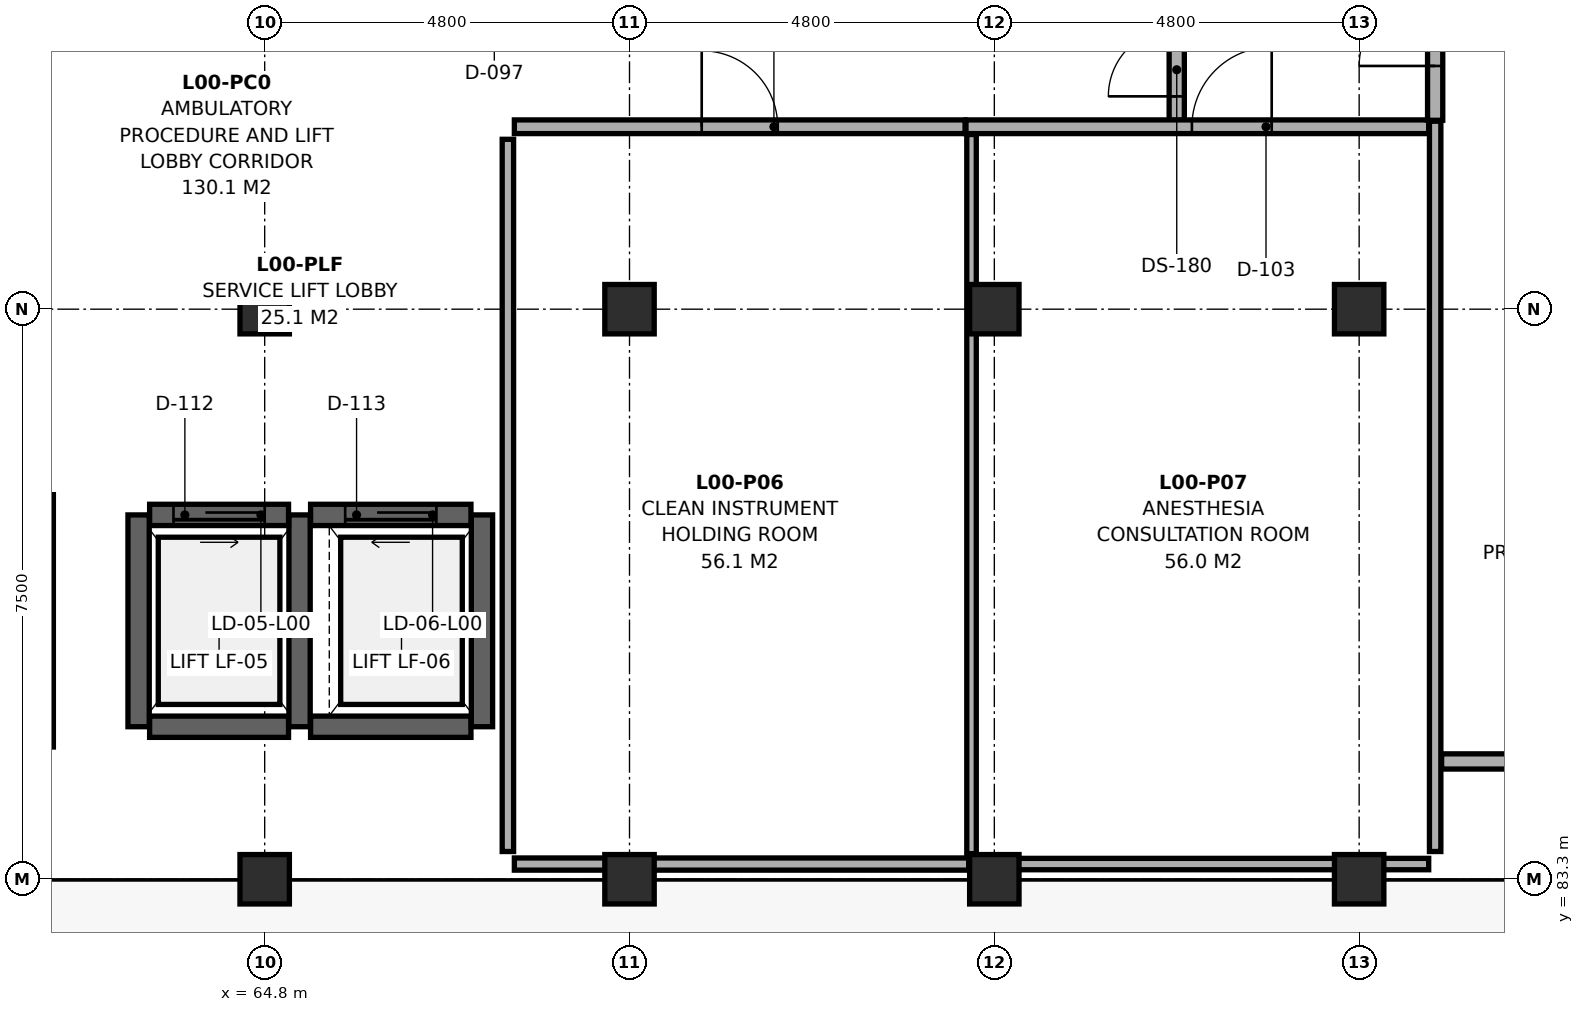
"""IFC4 building model, lengths in metres.
Left out: names, types, materials, properties, quantities, classifications, styles, units other than length and angle.
Written with IfcOpenShell. Run it as: python <this file> out.ifc"""

import sys

from ifc_helpers import new_model, si_unit, direction, frame, frame_2d, origin, origin_2d, place, context, subcontext, project, spatial, rectangle, extrude, element, fill, save


model = new_model("IFC4")
c1 = context("Model", 3, precision=1e-05, world=origin(), true_north=direction((0.0, 1.0)))
c2 = subcontext(c1, "Body", "Model", "MODEL_VIEW")
j1 = project(units=[si_unit("LENGTHUNIT", "METRE"), si_unit("PLANEANGLEUNIT", "RADIAN")], contexts=[c1])
p1 = place(None, origin())
s1 = spatial("IfcSite", under=j1, at=p1, CompositionType="ELEMENT")
p2 = place(p1, origin())
s2 = spatial("IfcBuilding", under=s1, at=p2, CompositionType="ELEMENT")
p3 = place(p2, origin())
s3 = spatial("IfcBuildingStorey", under=s2, at=p3, CompositionType="ELEMENT", Elevation=0.0)
for number, where, z_axis, x_axis in (
    (1, (64.8, 83.3, 0.0), (0.0, 0.0, 1.0), (1.0, 0.0, 0.0)),
    (2, (64.8, 90.8, 0.0), (0.0, 0.0, 1.0), (1.0, 0.0, 0.0)),
    (3, (69.6, 83.3, 0.0), (0.0, 0.0, 1.0), (1.0, 0.0, 0.0)),
    (4, (69.6, 90.8, 0.0), (0.0, 0.0, 1.0), (1.0, 0.0, 0.0)),
    (5, (74.4, 83.3, 0.0), (0.0, 0.0, 1.0), (1.0, 0.0, 0.0)),
    (6, (74.4, 90.8, 0.0), (0.0, 0.0, 1.0), (1.0, 0.0, 0.0)),
    (7, (79.2, 83.3, 0.0), (0.0, 0.0, 1.0), (1.0, 0.0, 0.0)),
    (8, (79.2, 90.8, 0.0), (0.0, 0.0, 1.0), (1.0, 0.0, 0.0)),
):
    element("IfcColumn", number, at=place(p3, frame(where, z_axis=z_axis, x_axis=x_axis)), inside=s3, PredefinedType="COLUMN", context=c2, shape_type="SweptSolid", body=[
        extrude(rectangle(XDim=0.65, YDim=0.65, at=origin_2d()), origin(), (0.0, 0.0, 1.0), 4.7),
    ])
p4 = place(p3, frame((61.86, 85.04, 0.0), z_axis=(0.0, 0.0, 1.0), x_axis=(0.0, 1.0, 0.0)))
e9 = element("IfcWall", 9, at=p4, inside=s3, PredefinedType="SHEAR", context=c2, shape_type="SweptSolid", body=[
    extrude(rectangle(XDim=3.32, YDim=0.32, at=frame_2d((1.66, 0.0))), origin(), (0.0, 0.0, 1.0), 4.7),
])
p5 = place(p3, frame((63.286, 85.307, 0.0), z_axis=(0.0, 0.0, 1.0), x_axis=(1.0, 0.0, 0.0)))
e10 = element("IfcWall", 10, at=p5, inside=s3, PredefinedType="SHEAR", context=c2, shape_type="SweptSolid", body=[
    extrude(rectangle(XDim=1.828, YDim=0.28, at=frame_2d((0.914, 0.0))), origin(), (0.0, 0.0, 1.0), 4.7),
])
p6 = place(p3, frame((65.259, 85.307, 0.0), z_axis=(0.0, 0.0, 1.0), x_axis=(0.0, 1.0, 0.0)))
e11 = element("IfcWall", 11, at=p6, inside=s3, PredefinedType="SHEAR", context=c2, shape_type="SweptSolid", body=[
    extrude(rectangle(XDim=2.787, YDim=0.28, at=frame_2d((1.393, 0.0))), origin(), (0.0, 0.0, 1.0), 4.7),
])
p7 = place(p3, frame((65.114, 88.093, 0.0), z_axis=(0.0, 0.0, 1.0), x_axis=(-1.0, 0.0, 0.0)))
e12 = element("IfcWall", 12, at=p7, inside=s3, PredefinedType="SHEAR", context=c2, shape_type="SweptSolid", body=[
    extrude(rectangle(XDim=1.828, YDim=0.28, at=frame_2d((0.914, 0.0))), origin(), (0.0, 0.0, 1.0), 4.7),
])
p8 = place(p7, frame((0.314, 0.0, 0.0)))
e13 = element("IfcOpeningElement", 13, at=p8, cuts=e12, PredefinedType="OPENING", context=c2, shape_type="SweptSolid", body=[
    extrude(rectangle(XDim=1.2, YDim=2.15, at=frame_2d((0.6, 1.075))), frame((0.0, 0.152, 0.0), z_axis=(0.0, -1.0, 0.0), x_axis=(1.0, 0.0, 0.0)), (0.0, 0.0, 1.0), 0.304),
])
p9 = place(p3, frame((63.141, 88.093, 0.0), z_axis=(0.0, 0.0, 1.0), x_axis=(0.0, -1.0, 0.0)))
e14 = element("IfcWall", 14, at=p9, inside=s3, PredefinedType="SHEAR", context=c2, shape_type="SweptSolid", body=[
    extrude(rectangle(XDim=2.787, YDim=0.28, at=frame_2d((1.393, 0.0))), origin(), (0.0, 0.0, 1.0), 4.7),
])
p10 = place(p3, frame((65.404, 85.307, 0.0), z_axis=(0.0, 0.0, 1.0), x_axis=(1.0, 0.0, 0.0)))
e15 = element("IfcWall", 15, at=p10, inside=s3, PredefinedType="SHEAR", context=c2, shape_type="SweptSolid", body=[
    extrude(rectangle(XDim=2.11, YDim=0.28, at=frame_2d((1.055, 0.0))), origin(), (0.0, 0.0, 1.0), 4.7),
])
p11 = place(p3, frame((67.659, 85.307, 0.0), z_axis=(0.0, 0.0, 1.0), x_axis=(0.0, 1.0, 0.0)))
e16 = element("IfcWall", 16, at=p11, inside=s3, PredefinedType="SHEAR", context=c2, shape_type="SweptSolid", body=[
    extrude(rectangle(XDim=2.787, YDim=0.28, at=frame_2d((1.393, 0.0))), origin(), (0.0, 0.0, 1.0), 4.7),
])
p12 = place(p3, frame((67.514, 88.093, 0.0), z_axis=(0.0, 0.0, 1.0), x_axis=(-1.0, 0.0, 0.0)))
e17 = element("IfcWall", 17, at=p12, inside=s3, PredefinedType="SHEAR", context=c2, shape_type="SweptSolid", body=[
    extrude(rectangle(XDim=2.11, YDim=0.28, at=frame_2d((1.055, 0.0))), origin(), (0.0, 0.0, 1.0), 4.7),
])
p13 = place(p12, frame((0.455, 0.0, 0.0)))
e18 = element("IfcOpeningElement", 18, at=p13, cuts=e17, PredefinedType="OPENING", context=c2, shape_type="SweptSolid", body=[
    extrude(rectangle(XDim=1.2, YDim=2.15, at=frame_2d((0.6, 1.075))), frame((0.0, 0.152, 0.0), z_axis=(0.0, -1.0, 0.0), x_axis=(1.0, 0.0, 0.0)), (0.0, 0.0, 1.0), 0.304),
])
p14 = place(p3, frame((76.8, 93.285, 0.0), z_axis=(0.0, 0.0, 1.0), x_axis=(0.0, 1.0, 0.0)))
e19 = element("IfcWall", 19, at=p14, inside=s3, PredefinedType="PARTITIONING", context=c2, shape_type="SweptSolid", body=[
    extrude(rectangle(XDim=2.43, YDim=0.2, at=frame_2d((1.215, 0.0))), origin(), (0.0, 0.0, 1.0), 4.7),
])
p15 = place(p14, frame((0.315, 0.0, 0.0)))
e20 = element("IfcOpeningElement", 20, at=p15, cuts=e19, PredefinedType="OPENING", context=c2, shape_type="SweptSolid", body=[
    extrude(rectangle(XDim=1.8, YDim=2.15, at=frame_2d((0.9, 1.075))), frame((0.0, 0.112, 0.0), z_axis=(0.0, -1.0, 0.0), x_axis=(1.0, 0.0, 0.0)), (0.0, 0.0, 1.0), 0.224),
])
p16 = place(p3, frame((68.085, 93.2, 0.0), z_axis=(0.0, 0.0, 1.0), x_axis=(1.0, 0.0, 0.0)))
e21 = element("IfcWall", 21, at=p16, inside=s3, PredefinedType="PARTITIONING", context=c2, shape_type="SweptSolid", body=[
    extrude(rectangle(XDim=5.93, YDim=0.18, at=frame_2d((2.965, 0.0))), origin(), (0.0, 0.0, 1.0), 3.985),
])
p17 = place(p16, frame((2.465, 0.0, 0.0)))
e22 = element("IfcOpeningElement", 22, at=p17, cuts=e21, PredefinedType="OPENING", context=c2, shape_type="SweptSolid", body=[
    extrude(rectangle(XDim=1.0, YDim=2.15, at=frame_2d((0.5, 1.075))), frame((0.0, 0.102, 0.0), z_axis=(0.0, -1.0, 0.0), x_axis=(1.0, 0.0, 0.0)), (0.0, 0.0, 1.0), 0.204),
])
p18 = place(p3, frame((74.027, 93.2, 0.0), z_axis=(0.0, 0.0, 1.0), x_axis=(1.0, 0.0, 0.0)))
e23 = element("IfcWall", 23, at=p18, inside=s3, PredefinedType="PARTITIONING", context=c2, shape_type="SweptSolid", body=[
    extrude(rectangle(XDim=6.088, YDim=0.18, at=frame_2d((3.044, 0.0))), origin(), (0.0, 0.0, 1.0), 3.985),
])
p19 = place(p18, frame((2.972, 0.0, 0.0)))
e24 = element("IfcOpeningElement", 24, at=p19, cuts=e23, PredefinedType="OPENING", context=c2, shape_type="SweptSolid", body=[
    extrude(rectangle(XDim=1.05, YDim=2.15, at=frame_2d((0.525, 1.075))), frame((0.0, 0.102, 0.0), z_axis=(0.0, -1.0, 0.0), x_axis=(1.0, 0.0, 0.0)), (0.0, 0.0, 1.0), 0.204),
])
p20 = place(p3, frame((80.2, 93.285, 0.0), z_axis=(0.0, 0.0, 1.0), x_axis=(0.0, 1.0, 0.0)))
e25 = element("IfcWall", 25, at=p20, inside=s3, PredefinedType="PARTITIONING", context=c2, shape_type="SweptSolid", body=[
    extrude(rectangle(XDim=2.43, YDim=0.2, at=frame_2d((1.215, 0.0))), origin(), (0.0, 0.0, 1.0), 4.7),
])
p21 = place(p20, frame((0.715, 0.0, 0.0)))
e26 = element("IfcOpeningElement", 26, at=p21, cuts=e25, PredefinedType="OPENING", context=c2, shape_type="SweptSolid", body=[
    extrude(rectangle(XDim=1.0, YDim=2.15, at=frame_2d((0.5, 1.075))), frame((0.0, 0.112, 0.0), z_axis=(0.0, -1.0, 0.0), x_axis=(1.0, 0.0, 0.0)), (0.0, 0.0, 1.0), 0.224),
])
p22 = place(p3, frame((80.285, 84.85, 0.0), z_axis=(0.0, 0.0, 1.0), x_axis=(1.0, 0.0, 0.0)))
e27 = element("IfcWall", 27, at=p22, inside=s3, PredefinedType="PARTITIONING", context=c2, shape_type="SweptSolid", body=[
    extrude(rectangle(XDim=4.98, YDim=0.2, at=frame_2d((2.49, 0.0))), origin(), (0.0, 0.0, 1.0), 3.985),
])
p23 = place(p22, frame((1.99, 0.0, 0.0)))
e28 = element("IfcOpeningElement", 28, at=p23, cuts=e27, PredefinedType="OPENING", context=c2, shape_type="SweptSolid", body=[
    extrude(rectangle(XDim=1.0, YDim=2.15, at=frame_2d((0.5, 1.075))), frame((0.0, 0.112, 0.0), z_axis=(0.0, -1.0, 0.0), x_axis=(1.0, 0.0, 0.0)), (0.0, 0.0, 1.0), 0.224),
])
p24 = place(p3, frame((68.085, 83.5, 0.0), z_axis=(0.0, 0.0, 1.0), x_axis=(1.0, 0.0, 0.0)))
e29 = element("IfcWall", 29, at=p24, inside=s3, PredefinedType="PARTITIONING", context=c2, shape_type="SweptSolid", body=[
    extrude(rectangle(XDim=5.978, YDim=0.16, at=frame_2d((2.989, 0.0))), origin(), (0.0, 0.0, 1.0), 3.985),
])
p25 = place(p3, frame((74.555, 83.5, 0.0), z_axis=(0.0, 0.0, 1.0), x_axis=(1.0, 0.0, 0.0)))
e30 = element("IfcWall", 30, at=p25, inside=s3, PredefinedType="PARTITIONING", context=c2, shape_type="SweptSolid", body=[
    extrude(rectangle(XDim=5.56, YDim=0.15, at=frame_2d((2.78, 0.0))), origin(), (0.0, 0.0, 1.0), 3.985),
])
p26 = place(p3, frame((68.0, 83.665, 0.0), z_axis=(0.0, 0.0, 1.0), x_axis=(0.0, 1.0, 0.0)))
e31 = element("IfcWall", 31, at=p26, inside=s3, PredefinedType="PARTITIONING", context=c2, shape_type="SweptSolid", body=[
    extrude(rectangle(XDim=9.37, YDim=0.15, at=frame_2d((4.685, 0.0))), origin(), (0.0, 0.0, 1.0), 4.035),
])
p27 = place(p3, frame((74.1, 83.637, 0.0), z_axis=(0.0, 0.0, 1.0), x_axis=(0.0, 1.0, 0.0)))
e32 = element("IfcWall", 32, at=p27, inside=s3, PredefinedType="PARTITIONING", context=c2, shape_type="SweptSolid", body=[
    extrude(rectangle(XDim=9.461, YDim=0.125, at=frame_2d((4.73, 0.0))), origin(), (0.0, 0.0, 1.0), 3.985),
])
p28 = place(p3, frame((80.2, 83.665, 0.0), z_axis=(0.0, 0.0, 1.0), x_axis=(0.0, 1.0, 0.0)))
e33 = element("IfcWall", 33, at=p28, inside=s3, PredefinedType="PARTITIONING", context=c2, shape_type="SweptSolid", body=[
    extrude(rectangle(XDim=9.608, YDim=0.15, at=frame_2d((4.804, 0.0))), origin(), (0.0, 0.0, 1.0), 4.035),
])
p29 = place(p8, origin())
e34 = element("IfcDoor", 34, at=p29, inside=s3, OperationType="SLIDING_TO_LEFT", PredefinedType="DOOR", context=c2, shape_type="SweptSolid", body=[
    extrude(rectangle(XDim=1.2, YDim=2.15, at=frame_2d((0.6, 1.075))), frame((0.0, 0.025, 0.0), z_axis=(0.0, -1.0, 0.0), x_axis=(1.0, 0.0, 0.0)), (0.0, 0.0, 1.0), 0.05),
])
fill(e13, e34)
p30 = place(p13, origin())
e35 = element("IfcDoor", 35, at=p30, inside=s3, OperationType="SLIDING_TO_RIGHT", PredefinedType="DOOR", context=c2, shape_type="SweptSolid", body=[
    extrude(rectangle(XDim=1.2, YDim=2.15, at=frame_2d((0.6, 1.075))), frame((0.0, 0.025, 0.0), z_axis=(0.0, -1.0, 0.0), x_axis=(1.0, 0.0, 0.0)), (0.0, 0.0, 1.0), 0.05),
])
fill(e18, e35)
p31 = place(p15, origin())
e36 = element("IfcDoor", 36, at=p31, inside=s3, OperationType="DOUBLE_DOOR_SINGLE_SWING", PredefinedType="DOOR", context=c2, shape_type="SweptSolid", body=[
    extrude(rectangle(XDim=1.8, YDim=2.15, at=frame_2d((0.9, 1.075))), frame((0.0, 0.025, 0.0), z_axis=(0.0, -1.0, 0.0), x_axis=(1.0, 0.0, 0.0)), (0.0, 0.0, 1.0), 0.05),
])
fill(e20, e36)
p32 = place(p17, origin())
e37 = element("IfcDoor", 37, at=p32, inside=s3, OperationType="SINGLE_SWING_LEFT", PredefinedType="DOOR", context=c2, shape_type="SweptSolid", body=[
    extrude(rectangle(XDim=1.0, YDim=2.15, at=frame_2d((0.5, 1.075))), frame((0.0, 0.025, 0.0), z_axis=(0.0, -1.0, 0.0), x_axis=(1.0, 0.0, 0.0)), (0.0, 0.0, 1.0), 0.05),
])
fill(e22, e37)
p33 = place(p19, origin())
e38 = element("IfcDoor", 38, at=p33, inside=s3, OperationType="SINGLE_SWING_RIGHT", PredefinedType="DOOR", context=c2, shape_type="SweptSolid", body=[
    extrude(rectangle(XDim=1.05, YDim=2.15, at=frame_2d((0.525, 1.075))), frame((0.0, 0.025, 0.0), z_axis=(0.0, -1.0, 0.0), x_axis=(1.0, 0.0, 0.0)), (0.0, 0.0, 1.0), 0.05),
])
fill(e24, e38)
p34 = place(p21, origin())
e39 = element("IfcDoor", 39, at=p34, inside=s3, OperationType="SINGLE_SWING_LEFT", PredefinedType="DOOR", context=c2, shape_type="SweptSolid", body=[
    extrude(rectangle(XDim=1.0, YDim=2.15, at=frame_2d((0.5, 1.075))), frame((0.0, 0.025, 0.0), z_axis=(0.0, -1.0, 0.0), x_axis=(1.0, 0.0, 0.0)), (0.0, 0.0, 1.0), 0.05),
])
fill(e26, e39)
save(model, sys.argv[1])
